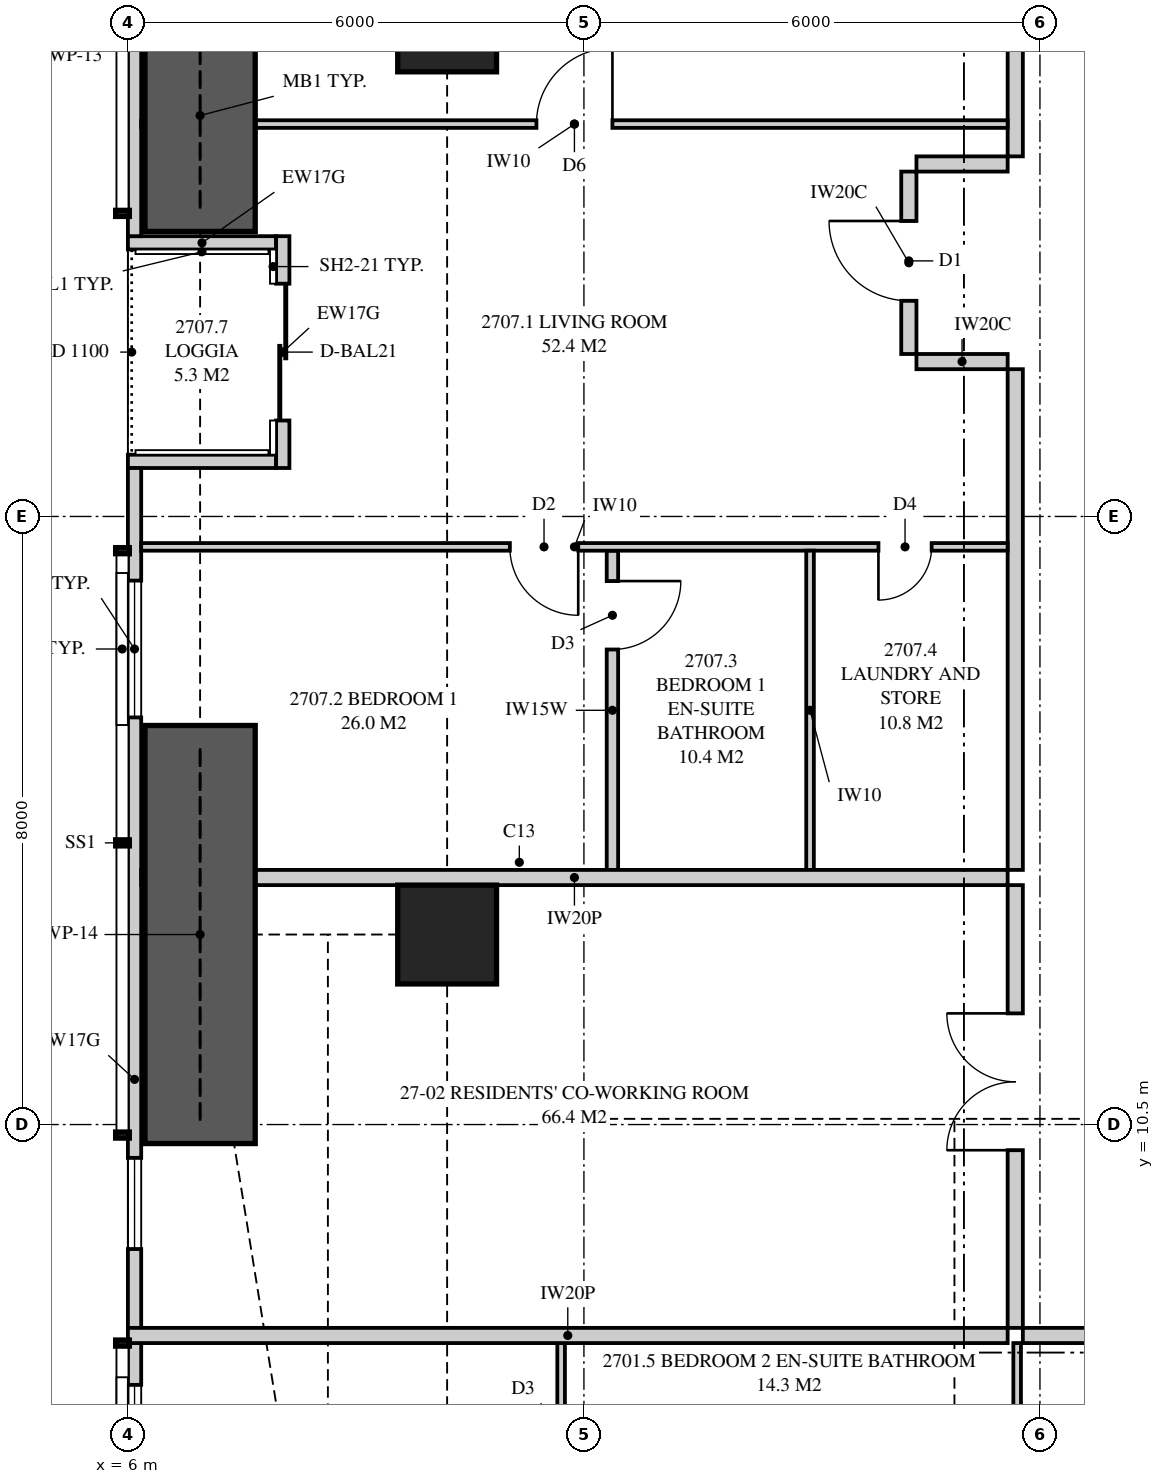
"""IFC4 building model, lengths in metres.
Left out: names, types, materials, properties, quantities, classifications, styles, units other than length and angle.
Written with IfcOpenShell. Run it as: python <this file> out.ifc"""

import sys

from ifc_helpers import new_model, si_unit, direction, frame, frame_2d, origin, origin_2d, place, context, subcontext, project, spatial, polyline, rectangle, outline, extrude, element, fill, save


model = new_model("IFC4")
c1 = context("Model", 3, precision=1e-05, world=origin(), true_north=direction((0.0, 1.0)))
c2 = subcontext(c1, "Body", "Model", "MODEL_VIEW")
j1 = project(units=[si_unit("LENGTHUNIT", "METRE"), si_unit("PLANEANGLEUNIT", "RADIAN")], contexts=[c1])
p1 = place(None, origin())
s1 = spatial("IfcSite", under=j1, at=p1, CompositionType="ELEMENT")
p2 = place(p1, origin())
s2 = spatial("IfcBuilding", under=s1, at=p2, CompositionType="ELEMENT")
p3 = place(p2, frame((0.0, 0.0, 101.5)))
s3 = spatial("IfcBuildingStorey", under=s2, at=p3, CompositionType="ELEMENT", Elevation=101.5)
for number, where, z_axis, x_axis in (
    (1, (10.2, 13.0, 0.0), (0.0, 0.0, 1.0), (1.0, 0.0, 0.0)),
    (2, (10.2, 25.0, 0.0), (0.0, 0.0, 1.0), (1.0, 0.0, 0.0)),
):
    element("IfcColumn", number, at=place(p3, frame(where, z_axis=z_axis, x_axis=x_axis)), inside=s3, PredefinedType="COLUMN", context=c2, shape_type="SweptSolid", body=[
        extrude(rectangle(XDim=1.3, YDim=1.3, at=origin_2d()), origin(), (0.0, 0.0, 1.0), 3.35),
    ])
p4 = place(p3, frame((6.087, 34.949, 0.0), z_axis=(0.0, 0.0, 1.0), x_axis=(0.0, -1.0, 0.0)))
e3 = element("IfcWall", 3, at=p4, inside=s3, PredefinedType="SOLIDWALL", context=c2, shape_type="SweptSolid", body=[
    extrude(outline(polyline([(0.0, 0.0), (12.761, 0.0), (12.761, 2.15), (9.949, 2.15), (9.949, 3.11), (9.823, 3.11), (9.823, 2.15), (9.73, 2.15), (9.73, 3.11), (0.0, 3.11), (0.0, 0.0)])), frame((0.0, 0.087, 0.0), z_axis=(0.0, -1.0, 0.0), x_axis=(1.0, 0.0, 0.0)), (0.0, 0.0, 1.0), 0.175),
])
p5 = place(p4, frame((2.724, 0.0, 0.4)))
e4 = element("IfcOpeningElement", 4, at=p5, cuts=e3, PredefinedType="OPENING", context=c2, shape_type="SweptSolid", body=[
    extrude(rectangle(XDim=1.8, YDim=1.7, at=frame_2d((0.9, 0.85))), frame((0.0, 0.097, 0.0), z_axis=(0.0, -1.0, 0.0), x_axis=(1.0, 0.0, 0.0)), (0.0, 0.0, 1.0), 0.195),
])
p6 = place(p4, frame((5.874, 0.0, 0.4)))
e5 = element("IfcOpeningElement", 5, at=p6, cuts=e3, PredefinedType="OPENING", context=c2, shape_type="SweptSolid", body=[
    extrude(rectangle(XDim=1.2, YDim=1.7, at=frame_2d((0.6, 0.85))), frame((0.0, 0.097, 0.0), z_axis=(0.0, -1.0, 0.0), x_axis=(1.0, 0.0, 0.0)), (0.0, 0.0, 1.0), 0.195),
])
p7 = place(p3, frame((6.087, 19.137, 0.0), z_axis=(0.0, 0.0, 1.0), x_axis=(0.0, -1.0, 0.0)))
e6 = element("IfcWall", 6, at=p7, inside=s3, PredefinedType="SOLIDWALL", context=c2, shape_type="SweptSolid", body=[
    extrude(outline(polyline([(0.0, 0.0), (16.086, 0.0), (16.086, 3.11), (6.356, 3.11), (6.356, 2.15), (6.263, 2.15), (6.263, 3.11), (6.137, 3.11), (6.137, 2.15), (0.0, 2.15), (0.0, 0.0)])), frame((0.0, 0.087, 0.0), z_axis=(0.0, -1.0, 0.0), x_axis=(1.0, 0.0, 0.0)), (0.0, 0.0, 1.0), 0.175),
])
p8 = place(p7, frame((1.481, 0.0, 0.4)))
e7 = element("IfcOpeningElement", 7, at=p8, cuts=e6, PredefinedType="OPENING", context=c2, shape_type="SweptSolid", body=[
    extrude(rectangle(XDim=1.8, YDim=1.7, at=frame_2d((0.9, 0.85))), frame((0.0, 0.097, 0.0), z_axis=(0.0, -1.0, 0.0), x_axis=(1.0, 0.0, 0.0)), (0.0, 0.0, 1.0), 0.195),
])
p9 = place(p7, frame((9.076, 0.0, 0.4)))
e8 = element("IfcOpeningElement", 8, at=p9, cuts=e6, PredefinedType="OPENING", context=c2, shape_type="SweptSolid", body=[
    extrude(rectangle(XDim=1.2, YDim=1.7, at=frame_2d((0.6, 0.85))), frame((0.0, 0.097, 0.0), z_axis=(0.0, -1.0, 0.0), x_axis=(1.0, 0.0, 0.0)), (0.0, 0.0, 1.0), 0.195),
])
p10 = place(p7, frame((12.062, 0.0, 0.4)))
e9 = element("IfcOpeningElement", 9, at=p10, cuts=e6, PredefinedType="OPENING", context=c2, shape_type="SweptSolid", body=[
    extrude(rectangle(XDim=1.8, YDim=1.7, at=frame_2d((0.9, 0.85))), frame((0.0, 0.097, 0.0), z_axis=(0.0, -1.0, 0.0), x_axis=(1.0, 0.0, 0.0)), (0.0, 0.0, 1.0), 0.195),
])
p11 = place(p3, frame((8.038, 22.188, 0.0), z_axis=(0.0, 0.0, 1.0), x_axis=(0.0, -1.0, 0.0)))
e10 = element("IfcWall", 10, at=p11, inside=s3, PredefinedType="SOLIDWALL", context=c2, shape_type="SweptSolid", body=[
    extrude(rectangle(XDim=3.05, YDim=0.175, at=frame_2d((1.525, 0.0))), origin(), (0.0, 0.0, 1.0), 3.11),
])
p12 = place(p11, frame((0.625, 0.0, 0.0)))
e11 = element("IfcOpeningElement", 11, at=p12, cuts=e10, PredefinedType="OPENING", context=c2, shape_type="SweptSolid", body=[
    extrude(rectangle(XDim=1.8, YDim=2.1, at=frame_2d((0.9, 1.05))), frame((0.0, 0.097, 0.0), z_axis=(0.0, -1.0, 0.0), x_axis=(1.0, 0.0, 0.0)), (0.0, 0.0, 1.0), 0.195),
])
for number, where, z_axis, x_axis in (
    (12, (6.0, 22.1, 0.0), (0.0, 0.0, 1.0), (1.0, 0.0, 0.0)),
    (13, (6.0, 19.225, 0.0), (0.0, 0.0, 1.0), (1.0, 0.0, 0.0)),
):
    element("IfcWall", number, at=place(p3, frame(where, z_axis=z_axis, x_axis=x_axis)), inside=s3, PredefinedType="SOLIDWALL", context=c2, shape_type="SweptSolid", body=[
        extrude(outline(polyline([(0.0, 0.0), (1.95, 0.0), (1.95, 3.11), (1.75, 3.11), (1.75, 2.15), (0.15, 2.15), (0.15, 3.11), (0.0, 3.11), (0.0, 0.0)])), frame((0.0, 0.087, 0.0), z_axis=(0.0, -1.0, 0.0), x_axis=(1.0, 0.0, 0.0)), (0.0, 0.0, 1.0), 0.175),
    ])
p13 = place(p3, frame((17.775, 7.725, 0.0), z_axis=(0.0, 0.0, 1.0), x_axis=(1.0, 0.0, 0.0)))
e14 = element("IfcWall", 14, at=p13, inside=s3, PredefinedType="PARTITIONING", context=c2, shape_type="SweptSolid", body=[
    extrude(rectangle(XDim=4.325, YDim=0.2, at=frame_2d((2.163, 0.0))), origin(), (0.0, 0.0, 1.0), 3.11),
])
p14 = place(p3, frame((11.7, 0.175, 0.0), z_axis=(0.0, 0.0, 1.0), x_axis=(0.0, 1.0, 0.0)))
e15 = element("IfcWall", 15, at=p14, inside=s3, PredefinedType="PARTITIONING", context=c2, shape_type="SweptSolid", body=[
    extrude(outline(polyline([(0.0, 0.0), (7.45, 0.0), (7.45, 3.11), (2.708, 3.11), (2.708, 2.15), (0.953, 2.15), (0.953, 3.11), (0.0, 3.11), (0.0, 0.0)])), frame((0.0, 0.05, 0.0), z_axis=(0.0, -1.0, 0.0), x_axis=(1.0, 0.0, 0.0)), (0.0, 0.0, 1.0), 0.1),
])
p15 = place(p14, frame((2.701, 0.0, 0.0)))
e16 = element("IfcOpeningElement", 16, at=p15, cuts=e15, PredefinedType="OPENING", context=c2, shape_type="SweptSolid", body=[
    extrude(rectangle(XDim=0.9, YDim=2.1, at=frame_2d((0.45, 1.05))), frame((0.0, 0.06, 0.0), z_axis=(0.0, -1.0, 0.0), x_axis=(1.0, 0.0, 0.0)), (0.0, 0.0, 1.0), 0.12),
])
p16 = place(p14, frame((5.525, 0.0, 0.0)))
e17 = element("IfcOpeningElement", 17, at=p16, cuts=e15, PredefinedType="OPENING", context=c2, shape_type="SweptSolid", body=[
    extrude(rectangle(XDim=0.9, YDim=2.1, at=frame_2d((0.45, 1.05))), frame((0.0, 0.06, 0.0), z_axis=(0.0, -1.0, 0.0), x_axis=(1.0, 0.0, 0.0)), (0.0, 0.0, 1.0), 0.12),
])
p17 = place(p3, frame((17.7, 0.175, 0.0), z_axis=(0.0, 0.0, 1.0), x_axis=(0.0, 1.0, 0.0)))
e18 = element("IfcWall", 18, at=p17, inside=s3, PredefinedType="PARTITIONING", context=c2, shape_type="SweptSolid", body=[
    extrude(outline(polyline([(1.635, 2.15), (0.0, 2.15), (0.0, 0.0), (7.45, 0.0), (7.45, 3.11), (1.635, 3.11), (1.635, 2.15)]), holes=[polyline([(1.021, 0.116), (0.529, 0.116), (0.529, 0.906), (1.021, 0.906), (1.021, 0.116)]), polyline([(1.021, 1.244), (0.529, 1.244), (0.529, 2.034), (1.021, 2.034), (1.021, 1.244)])]), frame((0.0, 0.05, 0.0), z_axis=(0.0, -1.0, 0.0), x_axis=(1.0, 0.0, 0.0)), (0.0, 0.0, 1.0), 0.1),
])
p18 = place(p17, frame((3.6, 0.0, 0.0)))
e19 = element("IfcOpeningElement", 19, at=p18, cuts=e18, PredefinedType="OPENING", context=c2, shape_type="SweptSolid", body=[
    extrude(rectangle(XDim=0.9, YDim=2.1, at=frame_2d((0.45, 1.05))), frame((0.0, 0.06, 0.0), z_axis=(0.0, -1.0, 0.0), x_axis=(1.0, 0.0, 0.0)), (0.0, 0.0, 1.0), 0.12),
])
p19 = place(p3, frame((6.0, 7.725, 0.0), z_axis=(0.0, 0.0, 1.0), x_axis=(1.0, 0.0, 0.0)))
e20 = element("IfcWall", 20, at=p19, inside=s3, PredefinedType="PARTITIONING", context=c2, shape_type="SweptSolid", body=[
    extrude(outline(polyline([(0.0, 0.0), (11.575, 0.0), (11.575, 3.11), (11.212, 3.11), (11.212, 2.541), (10.538, 2.541), (10.538, 3.11), (5.51, 3.11), (5.51, 2.51), (2.969, 2.51), (2.969, 2.541), (2.727, 2.541), (2.727, 2.15), (0.884, 2.15), (0.884, 3.11), (0.0, 3.11), (0.0, 0.0)])), frame((0.0, 0.1, 0.0), z_axis=(0.0, -1.0, 0.0), x_axis=(1.0, 0.0, 0.0)), (0.0, 0.0, 1.0), 0.2),
])
p20 = place(p3, frame((6.175, 13.75, 0.0), z_axis=(0.0, 0.0, 1.0), x_axis=(1.0, 0.0, 0.0)))
e21 = element("IfcWall", 21, at=p20, inside=s3, PredefinedType="PARTITIONING", context=c2, shape_type="SweptSolid", body=[
    extrude(outline(polyline([(1.685, 2.15), (0.0, 2.15), (0.0, 0.0), (11.4, 0.0), (11.4, 3.11), (5.335, 3.11), (5.335, 2.51), (2.715, 2.51), (2.715, 3.11), (1.685, 3.11), (1.685, 2.15)]), holes=[polyline([(1.021, 0.133), (0.529, 0.133), (0.529, 0.991), (1.021, 0.991), (1.021, 0.133)]), polyline([(1.021, 1.159), (0.529, 1.159), (0.529, 2.017), (1.021, 2.017), (1.021, 1.159)])]), frame((0.0, 0.1, 0.0), z_axis=(0.0, -1.0, 0.0), x_axis=(1.0, 0.0, 0.0)), (0.0, 0.0, 1.0), 0.2),
])
p21 = place(p3, frame((17.675, 7.825, 0.0), z_axis=(0.0, 0.0, 1.0), x_axis=(0.0, 1.0, 0.0)))
e22 = element("IfcWall", 22, at=p21, inside=s3, PredefinedType="PARTITIONING", context=c2, shape_type="SweptSolid", body=[
    extrude(outline(polyline([(0.0, 0.0), (5.825, 0.0), (5.825, 3.11), (3.087, 3.11), (3.087, 2.541), (2.413, 2.541), (2.413, 3.11), (0.0, 3.11), (0.0, 0.0)])), frame((0.0, 0.1, 0.0), z_axis=(0.0, -1.0, 0.0), x_axis=(1.0, 0.0, 0.0)), (0.0, 0.0, 1.0), 0.2),
])
p22 = place(p21, frame((2.337, 0.0, 0.0)))
e23 = element("IfcOpeningElement", 23, at=p22, cuts=e22, PredefinedType="OPENING", context=c2, shape_type="SweptSolid", body=[
    extrude(rectangle(XDim=1.8, YDim=2.1, at=frame_2d((0.9, 1.05))), frame((0.0, 0.11, 0.0), z_axis=(0.0, -1.0, 0.0), x_axis=(1.0, 0.0, 0.0)), (0.0, 0.0, 1.0), 0.22),
])
p23 = place(p3, frame((17.675, 13.85, 0.0), z_axis=(0.0, 0.0, 1.0), x_axis=(0.0, 1.0, 0.0)))
e24 = element("IfcWall", 24, at=p23, inside=s3, PredefinedType="PARTITIONING", context=c2, shape_type="SweptSolid", body=[
    extrude(rectangle(XDim=6.587, YDim=0.2, at=frame_2d((3.294, 0.0))), origin(), (0.0, 0.0, 1.0), 3.11),
])
p24 = place(p3, frame((6.175, 18.1, 0.0), z_axis=(0.0, 0.0, 1.0), x_axis=(1.0, 0.0, 0.0)))
e25 = element("IfcWall", 25, at=p24, inside=s3, PredefinedType="PARTITIONING", context=c2, shape_type="SweptSolid", body=[
    extrude(outline(polyline([(0.0, 0.0), (11.4, 0.0), (11.4, 3.11), (5.285, 3.11), (5.285, 2.51), (2.765, 2.51), (2.765, 3.11), (1.635, 3.11), (1.635, 2.15), (0.0, 2.15), (0.0, 3.11), (0.0, 0.0)])), frame((0.0, 0.05, 0.0), z_axis=(0.0, -1.0, 0.0), x_axis=(1.0, 0.0, 0.0)), (0.0, 0.0, 1.0), 0.1),
])
p25 = place(p24, frame((4.85, 0.0, 0.0)))
e26 = element("IfcOpeningElement", 26, at=p25, cuts=e25, PredefinedType="OPENING", context=c2, shape_type="SweptSolid", body=[
    extrude(rectangle(XDim=0.9, YDim=2.1, at=frame_2d((0.45, 1.05))), frame((0.0, 0.06, 0.0), z_axis=(0.0, -1.0, 0.0), x_axis=(1.0, 0.0, 0.0)), (0.0, 0.0, 1.0), 0.12),
])
p26 = place(p24, frame((9.7, 0.0, 0.0)))
e27 = element("IfcOpeningElement", 27, at=p26, cuts=e25, PredefinedType="OPENING", context=c2, shape_type="SweptSolid", body=[
    extrude(rectangle(XDim=0.7, YDim=2.1, at=frame_2d((0.35, 1.05))), frame((0.0, 0.06, 0.0), z_axis=(0.0, -1.0, 0.0), x_axis=(1.0, 0.0, 0.0)), (0.0, 0.0, 1.0), 0.12),
])
p27 = place(p3, frame((12.375, 13.85, 0.0), z_axis=(0.0, 0.0, 1.0), x_axis=(0.0, 1.0, 0.0)))
e28 = element("IfcWall", 28, at=p27, inside=s3, PredefinedType="PLUMBINGWALL", context=c2, shape_type="SweptSolid", body=[
    extrude(rectangle(XDim=4.2, YDim=0.15, at=frame_2d((2.1, 0.0))), origin(), (0.0, 0.0, 1.0), 3.11),
])
p28 = place(p27, frame((2.9, 0.0, 0.0)))
e29 = element("IfcOpeningElement", 29, at=p28, cuts=e28, PredefinedType="OPENING", context=c2, shape_type="SweptSolid", body=[
    extrude(rectangle(XDim=0.9, YDim=2.1, at=frame_2d((0.45, 1.05))), frame((0.0, 0.085, 0.0), z_axis=(0.0, -1.0, 0.0), x_axis=(1.0, 0.0, 0.0)), (0.0, 0.0, 1.0), 0.17),
])
p29 = place(p3, frame((14.975, 13.85, 0.0), z_axis=(0.0, 0.0, 1.0), x_axis=(0.0, 1.0, 0.0)))
e30 = element("IfcWall", 30, at=p29, inside=s3, PredefinedType="PARTITIONING", context=c2, shape_type="SweptSolid", body=[
    extrude(rectangle(XDim=4.2, YDim=0.1, at=frame_2d((2.1, 0.0))), origin(), (0.0, 0.0, 1.0), 3.11),
])
p30 = place(p3, frame((6.175, 23.663, 0.0), z_axis=(0.0, 0.0, 1.0), x_axis=(1.0, 0.0, 0.0)))
e31 = element("IfcWall", 31, at=p30, inside=s3, PredefinedType="PARTITIONING", context=c2, shape_type="SweptSolid", body=[
    extrude(outline(polyline([(0.529, 2.15), (0.0, 2.15), (0.0, 0.0), (0.529, 0.0), (0.529, 0.555), (1.021, 0.555), (1.021, 0.0), (11.4, 0.0), (11.4, 3.11), (5.285, 3.11), (5.285, 2.51), (2.765, 2.51), (2.765, 3.11), (1.635, 3.11), (1.635, 2.15), (1.021, 2.15), (1.021, 1.594), (0.529, 1.594), (0.529, 2.15)])), frame((0.0, 0.05, 0.0), z_axis=(0.0, -1.0, 0.0), x_axis=(1.0, 0.0, 0.0)), (0.0, 0.0, 1.0), 0.1),
])
p31 = place(p30, frame((5.2, 0.0, 0.0)))
e32 = element("IfcOpeningElement", 32, at=p31, cuts=e31, PredefinedType="OPENING", context=c2, shape_type="SweptSolid", body=[
    extrude(rectangle(XDim=1.0, YDim=2.1, at=frame_2d((0.5, 1.05))), frame((0.0, 0.06, 0.0), z_axis=(0.0, -1.0, 0.0), x_axis=(1.0, 0.0, 0.0)), (0.0, 0.0, 1.0), 0.12),
])
p32 = place(p3, frame((17.675, 23.238, 0.0), z_axis=(0.0, 0.0, 1.0), x_axis=(0.0, 1.0, 0.0)))
e33 = element("IfcWall", 33, at=p32, inside=s3, PredefinedType="PARTITIONING", context=c2, shape_type="SweptSolid", body=[
    extrude(outline(polyline([(0.0, 0.0), (5.938, 0.0), (5.938, 3.11), (3.525, 3.11), (3.525, 2.541), (2.85, 2.541), (2.85, 3.11), (0.0, 3.11), (0.0, 0.0)])), frame((0.0, 0.1, 0.0), z_axis=(0.0, -1.0, 0.0), x_axis=(1.0, 0.0, 0.0)), (0.0, 0.0, 1.0), 0.2),
])
p33 = place(p3, frame((16.275, 20.637, 0.0), z_axis=(0.0, 0.0, 1.0), x_axis=(0.0, 1.0, 0.0)))
e34 = element("IfcWall", 34, at=p33, inside=s3, PredefinedType="PARTITIONING", context=c2, shape_type="SweptSolid", body=[
    extrude(rectangle(XDim=2.4, YDim=0.2, at=frame_2d((1.2, 0.0))), origin(), (0.0, 0.0, 1.0), 3.11),
])
p34 = place(p33, frame((0.7, 0.0, 0.0)))
e35 = element("IfcOpeningElement", 35, at=p34, cuts=e34, PredefinedType="OPENING", context=c2, shape_type="SweptSolid", body=[
    extrude(rectangle(XDim=1.05, YDim=2.2, at=frame_2d((0.525, 1.1))), frame((0.0, 0.11, 0.0), z_axis=(0.0, -1.0, 0.0), x_axis=(1.0, 0.0, 0.0)), (0.0, 0.0, 1.0), 0.22),
])
for number, where, z_axis, x_axis in (
    (36, (17.575, 20.538, 0.0), (0.0, 0.0, 1.0), (-1.0, 0.0, 0.0)),
    (37, (17.575, 23.137, 0.0), (0.0, 0.0, 1.0), (-1.0, 0.0, 0.0)),
):
    element("IfcWall", number, at=place(p3, frame(where, z_axis=z_axis, x_axis=x_axis)), inside=s3, PredefinedType="PARTITIONING", context=c2, shape_type="SweptSolid", body=[
        extrude(rectangle(XDim=1.2, YDim=0.2, at=frame_2d((0.6, 0.0))), origin(), (0.0, 0.0, 1.0), 3.11),
    ])
for number, where, z_axis, x_axis in (
    (38, (6.95, 22.25, 0.0), (0.0, 0.0, 1.0), (0.0, 1.0, 0.0)),
    (39, (6.95, 10.25, 0.0), (0.0, 0.0, 1.0), (0.0, 1.0, 0.0)),
):
    element("IfcWall", number, at=place(p3, frame(where, z_axis=z_axis, x_axis=x_axis)), inside=s3, PredefinedType="SHEAR", context=c2, shape_type="SweptSolid", body=[
        extrude(rectangle(XDim=5.5, YDim=1.45, at=frame_2d((2.75, 0.0))), origin(), (0.0, 0.0, 1.0), 3.35),
    ])
p35 = place(p12, origin())
e40 = element("IfcDoor", 40, at=p35, inside=s3, OperationType="SLIDING_TO_LEFT", PredefinedType="DOOR", context=c2, shape_type="SweptSolid", body=[
    extrude(rectangle(XDim=1.8, YDim=2.1, at=frame_2d((0.9, 1.05))), frame((0.0, 0.025, 0.0), z_axis=(0.0, -1.0, 0.0), x_axis=(1.0, 0.0, 0.0)), (0.0, 0.0, 1.0), 0.05),
])
fill(e11, e40)
p36 = place(p8, origin())
e41 = element("IfcWindow", 41, at=p36, inside=s3, PartitioningType="SINGLE_PANEL", PredefinedType="WINDOW", context=c2, shape_type="SweptSolid", body=[
    extrude(rectangle(XDim=1.8, YDim=1.7, at=frame_2d((0.9, 0.85))), frame((0.0, 0.03, 0.0), z_axis=(0.0, -1.0, 0.0), x_axis=(1.0, 0.0, 0.0)), (0.0, 0.0, 1.0), 0.06),
])
fill(e7, e41)
p37 = place(p9, origin())
e42 = element("IfcWindow", 42, at=p37, inside=s3, PartitioningType="SINGLE_PANEL", PredefinedType="WINDOW", context=c2, shape_type="SweptSolid", body=[
    extrude(rectangle(XDim=1.2, YDim=1.7, at=frame_2d((0.6, 0.85))), frame((0.0, 0.03, 0.0), z_axis=(0.0, -1.0, 0.0), x_axis=(1.0, 0.0, 0.0)), (0.0, 0.0, 1.0), 0.06),
])
fill(e8, e42)
p38 = place(p10, origin())
e43 = element("IfcWindow", 43, at=p38, inside=s3, PartitioningType="SINGLE_PANEL", PredefinedType="WINDOW", context=c2, shape_type="SweptSolid", body=[
    extrude(rectangle(XDim=1.8, YDim=1.7, at=frame_2d((0.9, 0.85))), frame((0.0, 0.03, 0.0), z_axis=(0.0, -1.0, 0.0), x_axis=(1.0, 0.0, 0.0)), (0.0, 0.0, 1.0), 0.06),
])
fill(e9, e43)
p39 = place(p22, origin())
e44 = element("IfcDoor", 44, at=p39, inside=s3, OperationType="DOUBLE_DOOR_SINGLE_SWING", PredefinedType="DOOR", context=c2, shape_type="SweptSolid", body=[
    extrude(rectangle(XDim=1.8, YDim=2.1, at=frame_2d((0.9, 1.05))), frame((0.0, 0.025, 0.0), z_axis=(0.0, -1.0, 0.0), x_axis=(1.0, 0.0, 0.0)), (0.0, 0.0, 1.0), 0.05),
])
fill(e23, e44)
p40 = place(p34, origin())
e45 = element("IfcDoor", 45, at=p40, inside=s3, OperationType="SINGLE_SWING_RIGHT", PredefinedType="DOOR", context=c2, shape_type="SweptSolid", body=[
    extrude(rectangle(XDim=1.05, YDim=2.2, at=frame_2d((0.525, 1.1))), frame((0.0, 0.025, 0.0), z_axis=(0.0, -1.0, 0.0), x_axis=(1.0, 0.0, 0.0)), (0.0, 0.0, 1.0), 0.05),
])
fill(e35, e45)
p41 = place(p25, frame((0.9, 0.0, 0.0), z_axis=(0.0, 0.0, 1.0), x_axis=(-1.0, 0.0, 0.0)))
e46 = element("IfcDoor", 46, at=p41, inside=s3, OperationType="SINGLE_SWING_LEFT", PredefinedType="DOOR", context=c2, shape_type="SweptSolid", body=[
    extrude(rectangle(XDim=0.9, YDim=2.1, at=frame_2d((0.45, 1.05))), frame((0.0, 0.025, 0.0), z_axis=(0.0, -1.0, 0.0), x_axis=(1.0, 0.0, 0.0)), (0.0, 0.0, 1.0), 0.05),
])
fill(e26, e46)
p42 = place(p28, frame((0.9, 0.0, 0.0), z_axis=(0.0, 0.0, 1.0), x_axis=(-1.0, 0.0, 0.0)))
e47 = element("IfcDoor", 47, at=p42, inside=s3, OperationType="SINGLE_SWING_LEFT", PredefinedType="DOOR", context=c2, shape_type="SweptSolid", body=[
    extrude(rectangle(XDim=0.9, YDim=2.1, at=frame_2d((0.45, 1.05))), frame((0.0, 0.025, 0.0), z_axis=(0.0, -1.0, 0.0), x_axis=(1.0, 0.0, 0.0)), (0.0, 0.0, 1.0), 0.05),
])
fill(e29, e47)
p43 = place(p26, frame((0.7, 0.0, 0.0), z_axis=(0.0, 0.0, 1.0), x_axis=(-1.0, 0.0, 0.0)))
e48 = element("IfcDoor", 48, at=p43, inside=s3, OperationType="SINGLE_SWING_RIGHT", PredefinedType="DOOR", context=c2, shape_type="SweptSolid", body=[
    extrude(rectangle(XDim=0.7, YDim=2.1, at=frame_2d((0.35, 1.05))), frame((0.0, 0.025, 0.0), z_axis=(0.0, -1.0, 0.0), x_axis=(1.0, 0.0, 0.0)), (0.0, 0.0, 1.0), 0.05),
])
fill(e27, e48)
p44 = place(p31, origin())
e49 = element("IfcDoor", 49, at=p44, inside=s3, OperationType="SINGLE_SWING_RIGHT", PredefinedType="DOOR", context=c2, shape_type="SweptSolid", body=[
    extrude(rectangle(XDim=1.0, YDim=2.1, at=frame_2d((0.5, 1.05))), frame((0.0, 0.025, 0.0), z_axis=(0.0, -1.0, 0.0), x_axis=(1.0, 0.0, 0.0)), (0.0, 0.0, 1.0), 0.05),
])
fill(e32, e49)
save(model, sys.argv[1])
